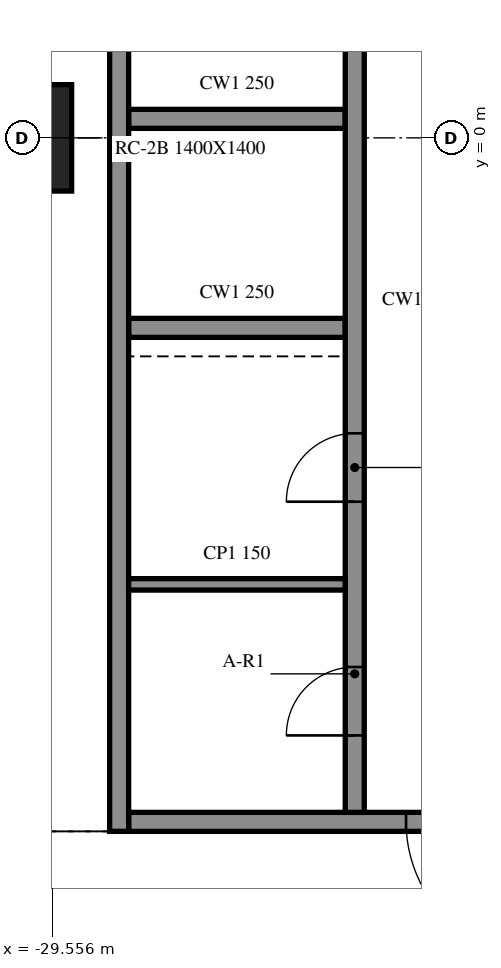
"""IFC4 building model, lengths in metres.
Left out: names, types, materials, properties, quantities, classifications, styles, units other than length and angle.
Written with IfcOpenShell. Run it as: python <this file> out.ifc"""

import sys

from ifc_helpers import new_model, si_unit, direction, frame, frame_2d, origin, origin_2d, place, context, subcontext, project, spatial, rectangle, extrude, element, fill, save


model = new_model("IFC4")
c1 = context("Model", 3, precision=1e-05, world=origin(), true_north=direction((0.0, 1.0)))
c2 = subcontext(c1, "Body", "Model", "MODEL_VIEW")
j1 = project(units=[si_unit("LENGTHUNIT", "METRE"), si_unit("PLANEANGLEUNIT", "RADIAN")], contexts=[c1])
p1 = place(None, origin())
s1 = spatial("IfcSite", under=j1, at=p1, CompositionType="ELEMENT")
p2 = place(p1, origin())
s2 = spatial("IfcBuilding", under=s1, at=p2, CompositionType="ELEMENT")
p3 = place(p2, frame((0.0, 0.0, 117.6)))
s3 = spatial("IfcBuildingStorey", under=s2, at=p3, CompositionType="ELEMENT", Elevation=117.6)
p4 = place(p3, frame((-30.0, 0.0, -0.55), z_axis=(0.0, 0.0, 1.0), x_axis=(1.0, 0.0, 0.0)))
e1 = element("IfcColumn", 1, at=p4, inside=s3, PredefinedType="COLUMN", context=c2, shape_type="SweptSolid", body=[
    extrude(rectangle(XDim=1.4, YDim=1.4, at=origin_2d()), origin(), (0.0, 0.0, 1.0), 4.61),
])
p5 = place(p3, frame((-28.675, 15.125, 0.0), z_axis=(0.0, 0.0, 1.0), x_axis=(0.0, -1.0, 0.0)))
e2 = element("IfcWall", 2, at=p5, inside=s3, PredefinedType="SOLIDWALL", context=c2, shape_type="SweptSolid", body=[
    extrude(rectangle(XDim=24.25, YDim=0.25, at=frame_2d((12.125, 0.0))), origin(), (0.0, 0.0, 1.0), 4.06),
])
p6 = place(p3, frame((-19.45, -9.0, 0.0), z_axis=(0.0, 0.0, 1.0), x_axis=(-1.0, 0.0, 0.0)))
e3 = element("IfcWall", 3, at=p6, inside=s3, PredefinedType="SOLIDWALL", context=c2, shape_type="SweptSolid", body=[
    extrude(rectangle(XDim=9.1, YDim=0.25, at=frame_2d((4.55, 0.0))), origin(), (0.0, 0.0, 1.0), 4.06),
])
p7 = place(p6, frame((3.65, 0.0, 0.0)))
e4 = element("IfcOpeningElement", 4, at=p7, cuts=e3, PredefinedType="OPENING", context=c2, shape_type="SweptSolid", body=[
    extrude(rectangle(XDim=1.8, YDim=2.1, at=frame_2d((0.9, 1.05))), frame((0.0, 0.135, 0.0), z_axis=(0.0, -1.0, 0.0), x_axis=(1.0, 0.0, 0.0)), (0.0, 0.0, 1.0), 0.27),
])
p8 = place(p3, frame((-25.575, -8.875, 0.0), z_axis=(0.0, 0.0, 1.0), x_axis=(0.0, 1.0, 0.0)))
e5 = element("IfcWall", 5, at=p8, inside=s3, PredefinedType="SOLIDWALL", context=c2, shape_type="SweptSolid", body=[
    extrude(rectangle(XDim=17.5, YDim=0.25, at=frame_2d((8.75, 0.0))), origin(), (0.0, 0.0, 1.0), 4.06),
])
p9 = place(p8, frame((1.012, 0.0, 0.0)))
e6 = element("IfcOpeningElement", 6, at=p9, cuts=e5, PredefinedType="OPENING", context=c2, shape_type="SweptSolid", body=[
    extrude(rectangle(XDim=0.9, YDim=2.1, at=frame_2d((0.45, 1.05))), frame((0.0, 0.135, 0.0), z_axis=(0.0, -1.0, 0.0), x_axis=(1.0, 0.0, 0.0)), (0.0, 0.0, 1.0), 0.27),
])
p10 = place(p8, frame((4.087, 0.0, 0.0)))
e7 = element("IfcOpeningElement", 7, at=p10, cuts=e5, PredefinedType="OPENING", context=c2, shape_type="SweptSolid", body=[
    extrude(rectangle(XDim=0.9, YDim=2.1, at=frame_2d((0.45, 1.05))), frame((0.0, 0.135, 0.0), z_axis=(0.0, -1.0, 0.0), x_axis=(1.0, 0.0, 0.0)), (0.0, 0.0, 1.0), 0.27),
])
for number, where, z_axis, x_axis in (
    (8, (-28.55, -2.5, 0.0), (0.0, 0.0, 1.0), (1.0, 0.0, 0.0)),
    (9, (-28.55, 0.25, 0.0), (0.0, 0.0, 1.0), (1.0, 0.0, 0.0)),
):
    element("IfcWall", number, at=place(p3, frame(where, z_axis=z_axis, x_axis=x_axis)), inside=s3, PredefinedType="SOLIDWALL", context=c2, shape_type="SweptSolid", body=[
        extrude(rectangle(XDim=2.85, YDim=0.25, at=frame_2d((1.425, 0.0))), origin(), (0.0, 0.0, 1.0), 4.06),
    ])
p11 = place(p3, frame((-28.55, -5.875, 0.0), z_axis=(0.0, 0.0, 1.0), x_axis=(1.0, 0.0, 0.0)))
e10 = element("IfcWall", 10, at=p11, inside=s3, PredefinedType="PARTITIONING", context=c2, shape_type="SweptSolid", body=[
    extrude(rectangle(XDim=2.85, YDim=0.15, at=frame_2d((1.425, 0.0))), origin(), (0.0, 0.0, 1.0), 4.06),
])
p12 = place(p7, origin())
e11 = element("IfcDoor", 11, at=p12, inside=s3, OperationType="DOUBLE_DOOR_SINGLE_SWING", PredefinedType="DOOR", context=c2, shape_type="SweptSolid", body=[
    extrude(rectangle(XDim=1.8, YDim=2.1, at=frame_2d((0.9, 1.05))), frame((0.0, 0.025, 0.0), z_axis=(0.0, -1.0, 0.0), x_axis=(1.0, 0.0, 0.0)), (0.0, 0.0, 1.0), 0.05),
])
fill(e4, e11)
p13 = place(p9, origin())
e12 = element("IfcDoor", 12, at=p13, inside=s3, OperationType="SINGLE_SWING_LEFT", PredefinedType="DOOR", context=c2, shape_type="SweptSolid", body=[
    extrude(rectangle(XDim=0.9, YDim=2.1, at=frame_2d((0.45, 1.05))), frame((0.0, 0.025, 0.0), z_axis=(0.0, -1.0, 0.0), x_axis=(1.0, 0.0, 0.0)), (0.0, 0.0, 1.0), 0.05),
])
fill(e6, e12)
p14 = place(p10, origin())
e13 = element("IfcDoor", 13, at=p14, inside=s3, OperationType="SINGLE_SWING_RIGHT", PredefinedType="DOOR", context=c2, shape_type="SweptSolid", body=[
    extrude(rectangle(XDim=0.9, YDim=2.1, at=frame_2d((0.45, 1.05))), frame((0.0, 0.025, 0.0), z_axis=(0.0, -1.0, 0.0), x_axis=(1.0, 0.0, 0.0)), (0.0, 0.0, 1.0), 0.05),
])
fill(e7, e13)
save(model, sys.argv[1])
